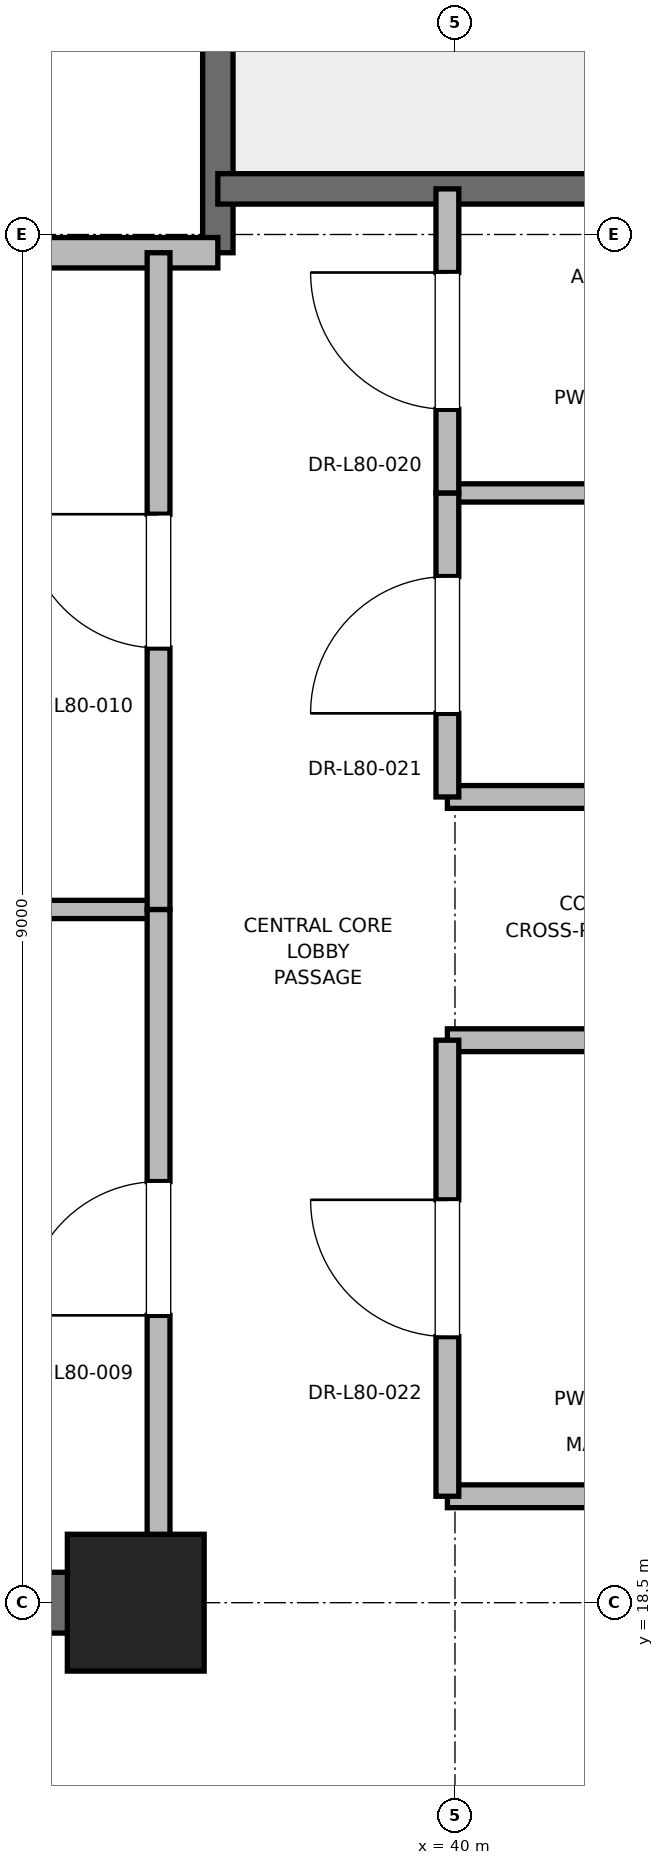
"""IFC4 building model, lengths in metres.
Left out: names, types, materials, properties, quantities, classifications, styles, units other than length and angle.
Written with IfcOpenShell. Run it as: python <this file> out.ifc"""

import sys

from ifc_helpers import new_model, si_unit, direction, frame, frame_2d, origin, origin_2d, place, context, subcontext, project, spatial, rectangle, extrude, element, fill, save


model = new_model("IFC4")
c1 = context("Model", 3, precision=1e-05, world=origin(), true_north=direction((0.0, 1.0)))
c2 = subcontext(c1, "Body", "Model", "MODEL_VIEW")
j1 = project(units=[si_unit("LENGTHUNIT", "METRE"), si_unit("PLANEANGLEUNIT", "RADIAN")], contexts=[c1])
p1 = place(None, origin())
s1 = spatial("IfcSite", under=j1, at=p1, CompositionType="ELEMENT")
p2 = place(p1, origin())
s2 = spatial("IfcBuilding", under=s1, at=p2, CompositionType="ELEMENT")
p3 = place(p2, frame((0.0, 0.0, 342.8)))
s3 = spatial("IfcBuildingStorey", under=s2, at=p3, CompositionType="ELEMENT", Elevation=342.8)
p4 = place(p3, frame((37.9, 18.5, 0.0), z_axis=(0.0, 0.0, 1.0), x_axis=(1.0, 0.0, 0.0)))
e1 = element("IfcColumn", 1, at=p4, inside=s3, PredefinedType="PILASTER", context=c2, shape_type="SweptSolid", body=[
    extrude(rectangle(XDim=0.9, YDim=0.9, at=origin_2d()), origin(), (0.0, 0.0, 1.0), 6.0),
])
p5 = place(p3, frame((29.0, 18.5, 0.0), z_axis=(0.0, 0.0, 1.0), x_axis=(1.0, 0.0, 0.0)))
e2 = element("IfcWall", 2, at=p5, inside=s3, PredefinedType="SHEAR", context=c2, shape_type="SweptSolid", body=[
    extrude(rectangle(XDim=9.2, YDim=0.4, at=frame_2d((4.6, 0.0))), origin(), (0.0, 0.0, 1.0), 5.7),
])
p6 = place(p3, frame((38.44, 27.38, 0.0), z_axis=(0.0, 0.0, 1.0), x_axis=(0.0, 1.0, 0.0)))
e3 = element("IfcWall", 3, at=p6, inside=s3, PredefinedType="SOLIDWALL", context=c2, shape_type="SweptSolid", body=[
    extrude(rectangle(XDim=8.87, YDim=0.2, at=frame_2d((4.435, 0.0))), origin(), (0.0, 0.0, 1.0), 5.7),
])
p7 = place(p3, frame((38.44, 27.8, 0.0), z_axis=(0.0, 0.0, 1.0), x_axis=(1.0, 0.0, 0.0)))
e4 = element("IfcWall", 4, at=p7, inside=s3, PredefinedType="SOLIDWALL", context=c2, shape_type="SweptSolid", body=[
    extrude(rectangle(XDim=3.32, YDim=0.2, at=frame_2d((1.66, 0.0))), origin(), (0.0, 0.0, 1.0), 5.7),
])
p8 = place(p3, frame((32.82, 27.38, 0.0), z_axis=(0.0, 0.0, 1.0), x_axis=(1.0, 0.0, 0.0)))
e5 = element("IfcWall", 5, at=p8, inside=s3, PredefinedType="PARTITIONING", context=c2, shape_type="SweptSolid", body=[
    extrude(rectangle(XDim=5.62, YDim=0.2, at=frame_2d((2.81, 0.0))), origin(), (0.0, 0.0, 1.0), 5.7),
])
for number, where, z_axis, x_axis in (
    (6, (39.95, 19.2, 0.0), (0.0, 0.0, 1.0), (1.0, 0.0, 0.0)),
    (7, (39.95, 22.2, 0.0), (0.0, 0.0, 1.0), (1.0, 0.0, 0.0)),
    (8, (39.95, 23.8, 0.0), (0.0, 0.0, 1.0), (1.0, 0.0, 0.0)),
):
    element("IfcWall", number, at=place(p3, frame(where, z_axis=z_axis, x_axis=x_axis)), inside=s3, PredefinedType="PARTITIONING", context=c2, shape_type="SweptSolid", body=[
        extrude(rectangle(XDim=1.81, YDim=0.15, at=frame_2d((0.905, 0.0))), origin(), (0.0, 0.0, 1.0), 2.85),
    ])
p9 = place(p3, frame((39.95, 25.8, 0.0), z_axis=(0.0, 0.0, 1.0), x_axis=(1.0, 0.0, 0.0)))
e9 = element("IfcWall", 9, at=p9, inside=s3, PredefinedType="PARTITIONING", context=c2, shape_type="SweptSolid", body=[
    extrude(rectangle(XDim=1.81, YDim=0.12, at=frame_2d((0.905, 0.0))), origin(), (0.0, 0.0, 1.0), 2.85),
])
p10 = place(p3, frame((39.95, 19.2, 0.0), z_axis=(0.0, 0.0, 1.0), x_axis=(0.0, 1.0, 0.0)))
e10 = element("IfcWall", 10, at=p10, inside=s3, PredefinedType="PARTITIONING", context=c2, shape_type="SweptSolid", body=[
    extrude(rectangle(XDim=3.0, YDim=0.15, at=frame_2d((1.5, 0.0))), origin(), (0.0, 0.0, 1.0), 2.85),
])
p11 = place(p10, frame((1.05, 0.0, 0.0)))
e11 = element("IfcOpeningElement", 11, at=p11, cuts=e10, PredefinedType="OPENING", context=c2, shape_type="SweptSolid", body=[
    extrude(rectangle(XDim=0.9, YDim=2.1, at=frame_2d((0.45, 1.05))), frame((0.0, 0.075, 0.0), z_axis=(0.0, -1.0, 0.0), x_axis=(1.0, 0.0, 0.0)), (0.0, 0.0, 1.0), 0.15),
])
p12 = place(p3, frame((39.95, 23.8, 0.0), z_axis=(0.0, 0.0, 1.0), x_axis=(0.0, 1.0, 0.0)))
e12 = element("IfcWall", 12, at=p12, inside=s3, PredefinedType="PARTITIONING", context=c2, shape_type="SweptSolid", body=[
    extrude(rectangle(XDim=2.0, YDim=0.15, at=frame_2d((1.0, 0.0))), origin(), (0.0, 0.0, 1.0), 2.85),
])
p13 = place(p12, frame((0.55, 0.0, 0.0)))
e13 = element("IfcOpeningElement", 13, at=p13, cuts=e12, PredefinedType="OPENING", context=c2, shape_type="SweptSolid", body=[
    extrude(rectangle(XDim=0.9, YDim=2.1, at=frame_2d((0.45, 1.05))), frame((0.0, 0.075, 0.0), z_axis=(0.0, -1.0, 0.0), x_axis=(1.0, 0.0, 0.0)), (0.0, 0.0, 1.0), 0.15),
])
p14 = place(p3, frame((39.95, 25.8, 0.0), z_axis=(0.0, 0.0, 1.0), x_axis=(0.0, 1.0, 0.0)))
e14 = element("IfcWall", 14, at=p14, inside=s3, PredefinedType="PARTITIONING", context=c2, shape_type="SweptSolid", body=[
    extrude(rectangle(XDim=2.0, YDim=0.15, at=frame_2d((1.0, 0.0))), origin(), (0.0, 0.0, 1.0), 2.85),
])
p15 = place(p14, frame((0.55, 0.0, 0.0)))
e15 = element("IfcOpeningElement", 15, at=p15, cuts=e14, PredefinedType="OPENING", context=c2, shape_type="SweptSolid", body=[
    extrude(rectangle(XDim=0.9, YDim=2.1, at=frame_2d((0.45, 1.05))), frame((0.0, 0.075, 0.0), z_axis=(0.0, -1.0, 0.0), x_axis=(1.0, 0.0, 0.0)), (0.0, 0.0, 1.0), 0.15),
])
p16 = place(p3, frame((32.82, 23.06, 0.0), z_axis=(0.0, 0.0, 1.0), x_axis=(1.0, 0.0, 0.0)))
e16 = element("IfcWall", 16, at=p16, inside=s3, PredefinedType="PARTITIONING", context=c2, shape_type="SweptSolid", body=[
    extrude(rectangle(XDim=5.23, YDim=0.12, at=frame_2d((2.615, 0.0))), origin(), (0.0, 0.0, 1.0), 2.85),
])
p17 = place(p3, frame((38.05, 18.6, 0.0), z_axis=(0.0, 0.0, 1.0), x_axis=(0.0, 1.0, 0.0)))
e17 = element("IfcWall", 17, at=p17, inside=s3, PredefinedType="PARTITIONING", context=c2, shape_type="SweptSolid", body=[
    extrude(rectangle(XDim=4.46, YDim=0.15, at=frame_2d((2.23, 0.0))), origin(), (0.0, 0.0, 1.0), 2.85),
])
p18 = place(p17, frame((1.79, 0.0, 0.0)))
e18 = element("IfcOpeningElement", 18, at=p18, cuts=e17, PredefinedType="OPENING", context=c2, shape_type="SweptSolid", body=[
    extrude(rectangle(XDim=0.88, YDim=2.1, at=frame_2d((0.44, 1.05))), frame((0.0, 0.075, 0.0), z_axis=(0.0, -1.0, 0.0), x_axis=(1.0, 0.0, 0.0)), (0.0, 0.0, 1.0), 0.15),
])
p19 = place(p3, frame((38.05, 23.06, 0.0), z_axis=(0.0, 0.0, 1.0), x_axis=(0.0, 1.0, 0.0)))
e19 = element("IfcWall", 19, at=p19, inside=s3, PredefinedType="PARTITIONING", context=c2, shape_type="SweptSolid", body=[
    extrude(rectangle(XDim=4.32, YDim=0.15, at=frame_2d((2.16, 0.0))), origin(), (0.0, 0.0, 1.0), 2.85),
])
p20 = place(p19, frame((1.72, 0.0, 0.0)))
e20 = element("IfcOpeningElement", 20, at=p20, cuts=e19, PredefinedType="OPENING", context=c2, shape_type="SweptSolid", body=[
    extrude(rectangle(XDim=0.88, YDim=2.1, at=frame_2d((0.44, 1.05))), frame((0.0, 0.075, 0.0), z_axis=(0.0, -1.0, 0.0), x_axis=(1.0, 0.0, 0.0)), (0.0, 0.0, 1.0), 0.15),
])
p21 = place(p11, origin())
e21 = element("IfcDoor", 21, at=p21, inside=s3, OperationType="SINGLE_SWING_RIGHT", PredefinedType="DOOR", context=c2, shape_type="SweptSolid", body=[
    extrude(rectangle(XDim=0.9, YDim=2.1, at=frame_2d((0.45, 1.05))), frame((0.0, 0.025, 0.0), z_axis=(0.0, -1.0, 0.0), x_axis=(1.0, 0.0, 0.0)), (0.0, 0.0, 1.0), 0.05),
])
fill(e11, e21)
p22 = place(p13, origin())
e22 = element("IfcDoor", 22, at=p22, inside=s3, OperationType="SINGLE_SWING_LEFT", PredefinedType="DOOR", context=c2, shape_type="SweptSolid", body=[
    extrude(rectangle(XDim=0.9, YDim=2.1, at=frame_2d((0.45, 1.05))), frame((0.0, 0.025, 0.0), z_axis=(0.0, -1.0, 0.0), x_axis=(1.0, 0.0, 0.0)), (0.0, 0.0, 1.0), 0.05),
])
fill(e13, e22)
p23 = place(p15, origin())
e23 = element("IfcDoor", 23, at=p23, inside=s3, OperationType="SINGLE_SWING_RIGHT", PredefinedType="DOOR", context=c2, shape_type="SweptSolid", body=[
    extrude(rectangle(XDim=0.9, YDim=2.1, at=frame_2d((0.45, 1.05))), frame((0.0, 0.025, 0.0), z_axis=(0.0, -1.0, 0.0), x_axis=(1.0, 0.0, 0.0)), (0.0, 0.0, 1.0), 0.05),
])
fill(e15, e23)
p24 = place(p18, origin())
e24 = element("IfcDoor", 24, at=p24, inside=s3, OperationType="SINGLE_SWING_LEFT", PredefinedType="DOOR", context=c2, shape_type="SweptSolid", body=[
    extrude(rectangle(XDim=0.88, YDim=2.1, at=frame_2d((0.44, 1.05))), frame((0.0, 0.025, 0.0), z_axis=(0.0, -1.0, 0.0), x_axis=(1.0, 0.0, 0.0)), (0.0, 0.0, 1.0), 0.05),
])
fill(e18, e24)
p25 = place(p20, origin())
e25 = element("IfcDoor", 25, at=p25, inside=s3, OperationType="SINGLE_SWING_RIGHT", PredefinedType="DOOR", context=c2, shape_type="SweptSolid", body=[
    extrude(rectangle(XDim=0.88, YDim=2.1, at=frame_2d((0.44, 1.05))), frame((0.0, 0.025, 0.0), z_axis=(0.0, -1.0, 0.0), x_axis=(1.0, 0.0, 0.0)), (0.0, 0.0, 1.0), 0.05),
])
fill(e20, e25)
save(model, sys.argv[1])
